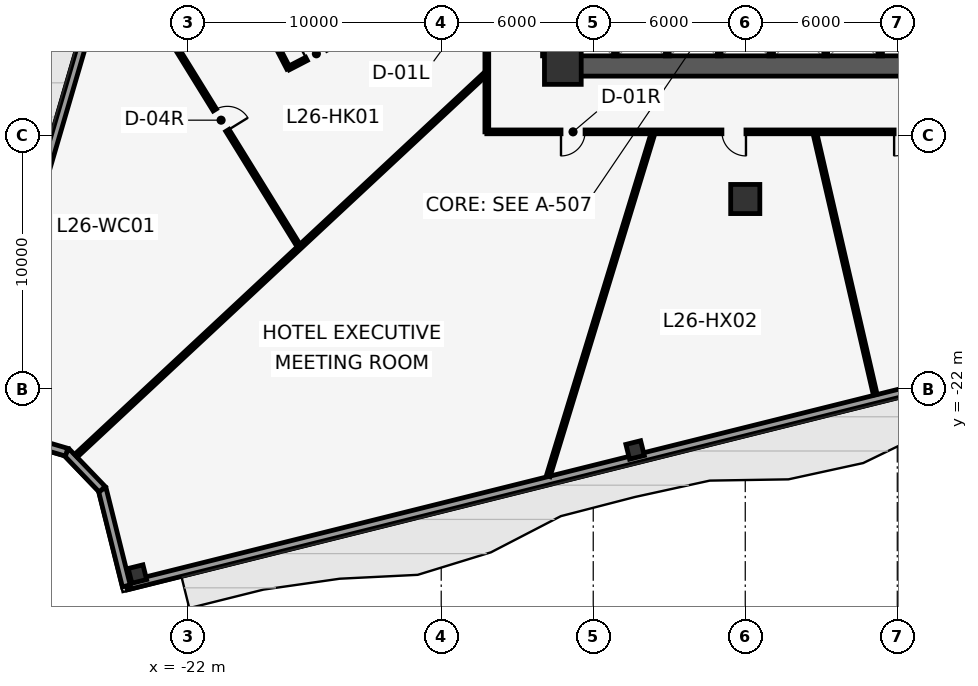
"""IFC4 building model, lengths in metres.
Left out: names, types, materials, properties, quantities, classifications, styles, units other than length and angle.
Written with IfcOpenShell. Run it as: python <this file> out.ifc"""

import sys

from ifc_helpers import new_model, si_unit, direction, frame, frame_2d, origin, origin_2d, place, context, subcontext, project, spatial, rectangle, hollow_rectangle, extrude, element, fill, save


model = new_model("IFC4")
c1 = context("Model", 3, precision=1e-05, world=origin(), true_north=direction((0.0, 1.0)))
c2 = subcontext(c1, "Body", "Model", "MODEL_VIEW")
j1 = project(units=[si_unit("LENGTHUNIT", "METRE"), si_unit("PLANEANGLEUNIT", "RADIAN")], contexts=[c1])
p1 = place(None, origin())
s1 = spatial("IfcSite", under=j1, at=p1, CompositionType="ELEMENT")
p2 = place(p1, origin())
s2 = spatial("IfcBuilding", under=s1, at=p2, CompositionType="ELEMENT")
p3 = place(p2, frame((0.0, 0.0, 115.0)))
s3 = spatial("IfcBuildingStorey", under=s2, at=p3, CompositionType="ELEMENT", Elevation=115.0)
p4 = place(p3, frame((-7.6, -8.85, 0.0), z_axis=(0.0, 0.0, 1.0), x_axis=(0.0, 1.0, 0.0)))
e1 = element("IfcWall", 1, at=p4, inside=s3, PredefinedType="SHEAR", context=c2, shape_type="SweptSolid", body=[
    extrude(rectangle(XDim=8.95, YDim=0.8, at=frame_2d((4.475, 0.0))), origin(), (0.0, 0.0, 1.0), 3.75),
])
p5 = place(p4, frame((2.49, 0.0, 0.0)))
e2 = element("IfcOpeningElement", 2, at=p5, cuts=e1, PredefinedType="OPENING", context=c2, shape_type="SweptSolid", body=[
    extrude(rectangle(XDim=1.8, YDim=2.2, at=frame_2d((0.9, 1.1))), frame((0.0, 0.41, 0.0), z_axis=(0.0, -1.0, 0.0), x_axis=(1.0, 0.0, 0.0)), (0.0, 0.0, 1.0), 0.82),
])
p6 = place(p4, frame((7.4, 0.0, 0.0)))
e3 = element("IfcOpeningElement", 3, at=p6, cuts=e1, PredefinedType="OPENING", context=c2, shape_type="SweptSolid", body=[
    extrude(rectangle(XDim=1.2, YDim=2.15, at=frame_2d((0.6, 1.075))), frame((0.0, 0.41, 0.0), z_axis=(0.0, -1.0, 0.0), x_axis=(1.0, 0.0, 0.0)), (0.0, 0.0, 1.0), 0.82),
])
p7 = place(p3, frame((-7.6, -9.25, 0.0), z_axis=(0.0, 0.0, 1.0), x_axis=(1.0, 0.0, 0.0)))
e4 = element("IfcWall", 4, at=p7, inside=s3, PredefinedType="SHEAR", context=c2, shape_type="SweptSolid", body=[
    extrude(rectangle(XDim=15.2, YDim=0.8, at=frame_2d((7.6, 0.0))), origin(), (0.0, 0.0, 1.0), 3.75),
])
p8 = place(p3, frame((-7.2, -9.25, 0.0), z_axis=(0.0, 0.0, 1.0), x_axis=(1.0, 0.0, 0.0)))
e5 = element("IfcColumn", 5, at=p8, inside=s3, PredefinedType="COLUMN", context=c2, shape_type="SweptSolid", body=[
    extrude(rectangle(XDim=1.45, YDim=1.45, at=origin_2d()), origin(), (0.0, 0.0, 1.0), 4.0),
])
p9 = place(p3, frame((0.0, -14.5, 0.0), z_axis=(0.0, 0.0, 1.0), x_axis=(1.0, 0.0, 0.0)))
e6 = element("IfcColumn", 6, at=p9, inside=s3, PredefinedType="COLUMN", context=c2, shape_type="SweptSolid", body=[
    extrude(rectangle(XDim=1.15, YDim=1.15, at=origin_2d()), origin(), (0.0, 0.0, 1.0), 4.0),
])
for number, where, z_axis, x_axis in (
    (7, (-23.991, -29.302, 0.0), (0.0, 0.0, 1.0), (0.97, 0.242, 0.0)),
    (8, (-4.348, -24.404, 0.0), (0.0, 0.0, 1.0), (0.97, 0.242, 0.0)),
):
    element("IfcColumn", number, at=place(p3, frame(where, z_axis=z_axis, x_axis=x_axis)), inside=s3, PredefinedType="COLUMN", context=c2, shape_type="SweptSolid", body=[
        extrude(hollow_rectangle(XDim=0.6, YDim=0.6, WallThickness=0.04, at=origin_2d()), origin(), (0.0, 0.0, 1.0), 4.0),
    ])
p10 = place(p3, frame((35.546, -14.818, 0.0), z_axis=(0.0, 0.0, 1.0), x_axis=(-0.970295883146, -0.241921266428, 0.0)))
e9 = element("IfcWall", 9, at=p10, inside=s3, PredefinedType="STANDARD", context=c2, shape_type="SweptSolid", body=[
    extrude(rectangle(XDim=61.811, YDim=0.32, at=frame_2d((30.905, 0.0))), origin(), (0.0, 0.0, 1.0), 3.75),
])
p11 = place(p10, frame((22.988, 0.0, 0.0)))
e10 = element("IfcOpeningElement", 10, at=p11, cuts=e9, PredefinedType="OPENING", context=c2, shape_type="SweptSolid", body=[
    extrude(rectangle(XDim=1.0, YDim=2.15, at=frame_2d((0.5, 1.075))), frame((0.0, 0.17, 0.0), z_axis=(0.0, -1.0, 0.0), x_axis=(1.0, 0.0, 0.0)), (0.0, 0.0, 1.0), 0.34),
])
p12 = place(p3, frame((-24.429, -29.772, 0.0), z_axis=(0.0, 0.0, 1.0), x_axis=(-0.241863642263, 0.970310248607, 0.0)))
e11 = element("IfcWall", 11, at=p12, inside=s3, PredefinedType="STANDARD", context=c2, shape_type="SweptSolid", body=[
    extrude(rectangle(XDim=3.933, YDim=0.32, at=frame_2d((1.966, 0.0))), origin(), (0.0, 0.0, 1.0), 3.75),
])
p13 = place(p3, frame((-25.38, -25.956, 0.0), z_axis=(0.0, 0.0, 1.0), x_axis=(-0.69281750058, 0.721112966802, 0.0)))
e12 = element("IfcWall", 12, at=p13, inside=s3, PredefinedType="STANDARD", context=c2, shape_type="SweptSolid", body=[
    extrude(rectangle(XDim=2.028, YDim=0.32, at=frame_2d((1.014, 0.0))), origin(), (0.0, 0.0, 1.0), 3.75),
])
p14 = place(p3, frame((-26.785, -24.494, 0.0), z_axis=(0.0, 0.0, 1.0), x_axis=(-0.959768832583, 0.28079136027, 0.0)))
e13 = element("IfcWall", 13, at=p14, inside=s3, PredefinedType="STANDARD", context=c2, shape_type="SweptSolid", body=[
    extrude(rectangle(XDim=3.933, YDim=0.32, at=frame_2d((1.966, 0.0))), origin(), (0.0, 0.0, 1.0), 3.75),
])
p15 = place(p3, frame((-30.559, -23.389, 0.0), z_axis=(0.0, 0.0, 1.0), x_axis=(0.280769703207, 0.95977516834, 0.0)))
e14 = element("IfcWall", 14, at=p15, inside=s3, PredefinedType="STANDARD", context=c2, shape_type="SweptSolid", body=[
    extrude(rectangle(XDim=61.076, YDim=0.32, at=frame_2d((30.538, 0.0))), origin(), (0.0, 0.0, 1.0), 3.75),
])
p16 = place(p15, frame((30.038, 0.0, 0.0)))
e15 = element("IfcOpeningElement", 15, at=p16, cuts=e14, PredefinedType="OPENING", context=c2, shape_type="SweptSolid", body=[
    extrude(rectangle(XDim=1.0, YDim=2.15, at=frame_2d((0.5, 1.075))), frame((0.0, 0.17, 0.0), z_axis=(0.0, -1.0, 0.0), x_axis=(1.0, 0.0, 0.0)), (0.0, 0.0, 1.0), 0.34),
])
for number, where, z_axis, x_axis in (
    (16, (-5.125, -8.85, 0.0), (0.0, 0.0, 1.0), (0.0, 1.0, 0.0)),
    (17, (-3.075, -8.85, 0.0), (0.0, 0.0, 1.0), (0.0, 1.0, 0.0)),
    (18, (-1.025, -8.85, 0.0), (0.0, 0.0, 1.0), (0.0, 1.0, 0.0)),
):
    element("IfcWall", number, at=place(p3, frame(where, z_axis=z_axis, x_axis=x_axis)), inside=s3, PredefinedType="PARTITIONING", context=c2, shape_type="SweptSolid", body=[
        extrude(rectangle(XDim=2.08, YDim=0.15, at=frame_2d((1.04, 0.0))), origin(), (0.0, 0.0, 1.0), 3.75),
    ])
p17 = place(p3, frame((1.025, -8.85, 0.0), z_axis=(0.0, 0.0, 1.0), x_axis=(0.0, 1.0, 0.0)))
e19 = element("IfcWall", 19, at=p17, inside=s3, PredefinedType="PARTITIONING", context=c2, shape_type="SweptSolid", body=[
    extrude(rectangle(XDim=2.08, YDim=0.18, at=frame_2d((1.04, 0.0))), origin(), (0.0, 0.0, 1.0), 2.798),
])
p18 = place(p3, frame((3.175, -8.85, 0.0), z_axis=(0.0, 0.0, 1.0), x_axis=(0.0, 1.0, 0.0)))
e20 = element("IfcWall", 20, at=p18, inside=s3, PredefinedType="PARTITIONING", context=c2, shape_type="SweptSolid", body=[
    extrude(rectangle(XDim=2.08, YDim=0.15, at=frame_2d((1.04, 0.0))), origin(), (0.0, 0.0, 1.0), 3.75),
])
p19 = place(p3, frame((5.325, -8.85, 0.0), z_axis=(0.0, 0.0, 1.0), x_axis=(0.0, 1.0, 0.0)))
e21 = element("IfcWall", 21, at=p19, inside=s3, PredefinedType="PARTITIONING", context=c2, shape_type="SweptSolid", body=[
    extrude(rectangle(XDim=2.08, YDim=0.18, at=frame_2d((1.04, 0.0))), origin(), (0.0, 0.0, 1.0), 3.75),
])
p20 = place(p3, frame((10.2, -11.85, 0.0), z_axis=(0.0, 0.0, 1.0), x_axis=(-1.0, 0.0, 0.0)))
e22 = element("IfcWall", 22, at=p20, inside=s3, PredefinedType="PARTITIONING", context=c2, shape_type="SweptSolid", body=[
    extrude(rectangle(XDim=20.4, YDim=0.15, at=frame_2d((10.2, 0.0))), origin(), (0.0, 0.0, 1.0), 3.75),
])
p21 = place(p20, frame((16.522, 0.0, 0.0)))
e23 = element("IfcOpeningElement", 23, at=p21, cuts=e22, PredefinedType="OPENING", context=c2, shape_type="SweptSolid", body=[
    extrude(rectangle(XDim=0.95, YDim=2.15, at=frame_2d((0.475, 1.075))), frame((0.0, 0.085, 0.0), z_axis=(0.0, -1.0, 0.0), x_axis=(1.0, 0.0, 0.0)), (0.0, 0.0, 1.0), 0.17),
])
p22 = place(p20, frame((10.172, 0.0, 0.0)))
e24 = element("IfcOpeningElement", 24, at=p22, cuts=e22, PredefinedType="OPENING", context=c2, shape_type="SweptSolid", body=[
    extrude(rectangle(XDim=0.95, YDim=2.15, at=frame_2d((0.475, 1.075))), frame((0.0, 0.085, 0.0), z_axis=(0.0, -1.0, 0.0), x_axis=(1.0, 0.0, 0.0)), (0.0, 0.0, 1.0), 0.17),
])
p23 = place(p20, frame((3.375, 0.0, 0.0)))
e25 = element("IfcOpeningElement", 25, at=p23, cuts=e22, PredefinedType="OPENING", context=c2, shape_type="SweptSolid", body=[
    extrude(rectangle(XDim=0.95, YDim=2.15, at=frame_2d((0.475, 1.075))), frame((0.0, 0.085, 0.0), z_axis=(0.0, -1.0, 0.0), x_axis=(1.0, 0.0, 0.0)), (0.0, 0.0, 1.0), 0.17),
])
p24 = place(p3, frame((-10.2, -11.85, 0.0), z_axis=(0.0, 0.0, 1.0), x_axis=(0.0, 1.0, 0.0)))
e26 = element("IfcWall", 26, at=p24, inside=s3, PredefinedType="PARTITIONING", context=c2, shape_type="SweptSolid", body=[
    extrude(rectangle(XDim=24.0, YDim=0.15, at=frame_2d((12.0, 0.0))), origin(), (0.0, 0.0, 1.0), 3.75),
])
p25 = place(p24, frame((5.187, 0.0, 0.0)))
e27 = element("IfcOpeningElement", 27, at=p25, cuts=e26, PredefinedType="OPENING", context=c2, shape_type="SweptSolid", body=[
    extrude(rectangle(XDim=0.95, YDim=2.15, at=frame_2d((0.475, 1.075))), frame((0.0, 0.085, 0.0), z_axis=(0.0, -1.0, 0.0), x_axis=(1.0, 0.0, 0.0)), (0.0, 0.0, 1.0), 0.17),
])
p26 = place(p24, frame((19.094, 0.0, 0.0)))
e28 = element("IfcOpeningElement", 28, at=p26, cuts=e26, PredefinedType="OPENING", context=c2, shape_type="SweptSolid", body=[
    extrude(rectangle(XDim=0.95, YDim=2.15, at=frame_2d((0.475, 1.075))), frame((0.0, 0.085, 0.0), z_axis=(0.0, -1.0, 0.0), x_axis=(1.0, 0.0, 0.0)), (0.0, 0.0, 1.0), 0.17),
])
p27 = place(p24, frame((11.767, 0.0, 0.0)))
e29 = element("IfcOpeningElement", 29, at=p27, cuts=e26, PredefinedType="OPENING", context=c2, shape_type="SweptSolid", body=[
    extrude(rectangle(XDim=0.95, YDim=2.15, at=frame_2d((0.475, 1.075))), frame((0.0, 0.085, 0.0), z_axis=(0.0, -1.0, 0.0), x_axis=(1.0, 0.0, 0.0)), (0.0, 0.0, 1.0), 0.17),
])
p28 = place(p3, frame((-10.305, -9.61, 0.0), z_axis=(0.0, 0.0, 1.0), x_axis=(-0.731358223389, -0.681993511026, 0.0)))
e30 = element("IfcWall", 30, at=p28, inside=s3, PredefinedType="PARTITIONING", context=c2, shape_type="SweptSolid", body=[
    extrude(rectangle(XDim=22.023, YDim=0.15, at=frame_2d((11.011, 0.0))), origin(), (0.0, 0.0, 1.0), 3.75),
])
p29 = place(p3, frame((-3.655, -11.955, 0.0), z_axis=(0.0, 0.0, 1.0), x_axis=(-0.292365011215, -0.956306802348, 0.0)))
e31 = element("IfcWall", 31, at=p29, inside=s3, PredefinedType="PARTITIONING", context=c2, shape_type="SweptSolid", body=[
    extrude(rectangle(XDim=14.101, YDim=0.15, at=frame_2d((7.05, 0.0))), origin(), (0.0, 0.0, 1.0), 3.75),
])
p30 = place(p3, frame((2.76, -11.955, 0.0), z_axis=(0.0, 0.0, 1.0), x_axis=(0.224945811952, -0.974371275072, 0.0)))
e32 = element("IfcWall", 32, at=p30, inside=s3, PredefinedType="PARTITIONING", context=c2, shape_type="SweptSolid", body=[
    extrude(rectangle(XDim=10.536, YDim=0.15, at=frame_2d((5.268, 0.0))), origin(), (0.0, 0.0, 1.0), 3.75),
])
p31 = place(p3, frame((-23.771, -6.396, 0.0), z_axis=(0.0, 0.0, 1.0), x_axis=(0.525453466411, -0.850822340232, 0.0)))
e33 = element("IfcWall", 33, at=p31, inside=s3, PredefinedType="PARTITIONING", context=c2, shape_type="SweptSolid", body=[
    extrude(rectangle(XDim=11.737, YDim=0.15, at=frame_2d((5.869, 0.0))), origin(), (0.0, 0.0, 1.0), 3.75),
])
p32 = place(p31, frame((5.394, 0.0, 0.0)))
e34 = element("IfcOpeningElement", 34, at=p32, cuts=e33, PredefinedType="OPENING", context=c2, shape_type="SweptSolid", body=[
    extrude(rectangle(XDim=0.95, YDim=2.15, at=frame_2d((0.475, 1.075))), frame((0.0, 0.085, 0.0), z_axis=(0.0, -1.0, 0.0), x_axis=(1.0, 0.0, 0.0)), (0.0, 0.0, 1.0), 0.17),
])
p33 = place(p3, frame((-19.132, -7.219, 0.0), z_axis=(0.0, 0.0, 1.0), x_axis=(0.460200871333, -0.887814821922, 0.0)))
e35 = element("IfcWall", 35, at=p33, inside=s3, PredefinedType="PARTITIONING", context=c2, shape_type="SweptSolid", body=[
    extrude(rectangle(XDim=2.39, YDim=0.14, at=frame_2d((1.195, 0.0))), origin(), (0.0, 0.0, 1.0), 3.75),
])
p34 = place(p3, frame((-18.032, -9.341, 0.0), z_axis=(0.0, 0.0, 1.0), x_axis=(0.887821307868, 0.460188358496, 0.0)))
e36 = element("IfcWall", 36, at=p34, inside=s3, PredefinedType="PARTITIONING", context=c2, shape_type="SweptSolid", body=[
    extrude(rectangle(XDim=2.49, YDim=0.14, at=frame_2d((1.245, 0.0))), origin(), (0.0, 0.0, 1.0), 3.75),
])
p35 = place(p34, frame((0.805, 0.0, 0.0)))
e37 = element("IfcOpeningElement", 37, at=p35, cuts=e36, PredefinedType="OPENING", context=c2, shape_type="SweptSolid", body=[
    extrude(rectangle(XDim=0.88, YDim=2.1, at=frame_2d((0.44, 1.05))), frame((0.0, 0.08, 0.0), z_axis=(0.0, -1.0, 0.0), x_axis=(1.0, 0.0, 0.0)), (0.0, 0.0, 1.0), 0.16),
])
p36 = place(p32, origin())
e38 = element("IfcDoor", 38, at=p36, inside=s3, OperationType="SINGLE_SWING_RIGHT", PredefinedType="DOOR", context=c2, shape_type="SweptSolid", body=[
    extrude(rectangle(XDim=0.95, YDim=2.15, at=frame_2d((0.475, 1.075))), frame((0.0, 0.025, 0.0), z_axis=(0.0, -1.0, 0.0), x_axis=(1.0, 0.0, 0.0)), (0.0, 0.0, 1.0), 0.05),
])
fill(e34, e38)
p37 = place(p35, origin())
e39 = element("IfcDoor", 39, at=p37, inside=s3, OperationType="SINGLE_SWING_LEFT", PredefinedType="DOOR", context=c2, shape_type="SweptSolid", body=[
    extrude(rectangle(XDim=0.88, YDim=2.1, at=frame_2d((0.44, 1.05))), frame((0.0, 0.025, 0.0), z_axis=(0.0, -1.0, 0.0), x_axis=(1.0, 0.0, 0.0)), (0.0, 0.0, 1.0), 0.05),
])
fill(e37, e39)
p38 = place(p21, origin())
e40 = element("IfcDoor", 40, at=p38, inside=s3, OperationType="SINGLE_SWING_RIGHT", PredefinedType="DOOR", context=c2, shape_type="SweptSolid", body=[
    extrude(rectangle(XDim=0.95, YDim=2.15, at=frame_2d((0.475, 1.075))), frame((0.0, 0.025, 0.0), z_axis=(0.0, -1.0, 0.0), x_axis=(1.0, 0.0, 0.0)), (0.0, 0.0, 1.0), 0.05),
])
fill(e23, e40)
p39 = place(p22, origin())
e41 = element("IfcDoor", 41, at=p39, inside=s3, OperationType="SINGLE_SWING_LEFT", PredefinedType="DOOR", context=c2, shape_type="SweptSolid", body=[
    extrude(rectangle(XDim=0.95, YDim=2.15, at=frame_2d((0.475, 1.075))), frame((0.0, 0.025, 0.0), z_axis=(0.0, -1.0, 0.0), x_axis=(1.0, 0.0, 0.0)), (0.0, 0.0, 1.0), 0.05),
])
fill(e24, e41)
p40 = place(p23, origin())
e42 = element("IfcDoor", 42, at=p40, inside=s3, OperationType="SINGLE_SWING_RIGHT", PredefinedType="DOOR", context=c2, shape_type="SweptSolid", body=[
    extrude(rectangle(XDim=0.95, YDim=2.15, at=frame_2d((0.475, 1.075))), frame((0.0, 0.025, 0.0), z_axis=(0.0, -1.0, 0.0), x_axis=(1.0, 0.0, 0.0)), (0.0, 0.0, 1.0), 0.05),
])
fill(e25, e42)
save(model, sys.argv[1])
